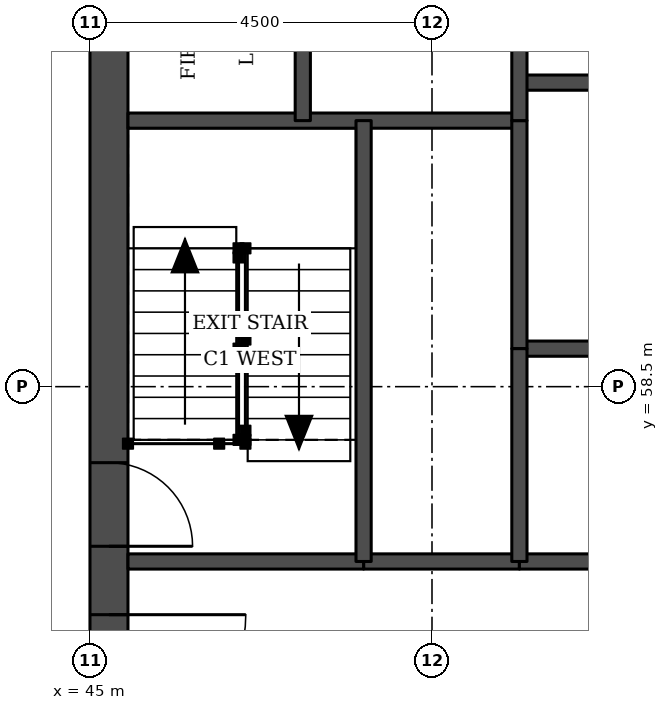
"""IFC4 building model, lengths in metres.
Left out: names, types, materials, properties, quantities, classifications, styles, units other than length and angle.
Written with IfcOpenShell. Run it as: python <this file> out.ifc"""

import sys

from ifc_helpers import new_model, si_unit, direction, frame, frame_2d, origin, place, context, subcontext, project, spatial, rectangle, extrude, element, fill, save


model = new_model("IFC4")
c1 = context("Model", 3, precision=1e-05, world=origin(), true_north=direction((0.0, 1.0)))
c2 = subcontext(c1, "Body", "Model", "MODEL_VIEW")
j1 = project(units=[si_unit("LENGTHUNIT", "METRE"), si_unit("PLANEANGLEUNIT", "RADIAN")], contexts=[c1])
p1 = place(None, origin())
s1 = spatial("IfcSite", under=j1, at=p1, CompositionType="ELEMENT")
p2 = place(p1, origin())
s2 = spatial("IfcBuilding", under=s1, at=p2, CompositionType="ELEMENT")
p3 = place(p2, frame((0.0, 0.0, 36.3)))
s3 = spatial("IfcBuildingStorey", under=s2, at=p3, CompositionType="ELEMENT", Elevation=36.3)
p4 = place(p3, frame((45.25, 49.5, 0.0), z_axis=(0.0, 0.0, 1.0), x_axis=(0.0, 1.0, 0.0)))
e1 = element("IfcWall", 1, at=p4, inside=s3, PredefinedType="SHEAR", context=c2, shape_type="SweptSolid", body=[
    extrude(rectangle(XDim=22.5, YDim=0.5, at=frame_2d((11.25, 0.0))), origin(), (0.0, 0.0, 1.0), 3.3),
])
p5 = place(p4, frame((4.2, 0.0, 0.0)))
e2 = element("IfcOpeningElement", 2, at=p5, cuts=e1, PredefinedType="OPENING", context=c2, shape_type="SweptSolid", body=[
    extrude(rectangle(XDim=1.8, YDim=2.1, at=frame_2d((0.9, 1.05))), frame((0.0, 0.26, 0.0), z_axis=(0.0, -1.0, 0.0), x_axis=(1.0, 0.0, 0.0)), (0.0, 0.0, 1.0), 0.52),
])
p6 = place(p4, frame((6.9, 0.0, 0.0)))
e3 = element("IfcOpeningElement", 3, at=p6, cuts=e1, PredefinedType="OPENING", context=c2, shape_type="SweptSolid", body=[
    extrude(rectangle(XDim=1.1, YDim=2.1, at=frame_2d((0.55, 1.05))), frame((0.0, 0.26, 0.0), z_axis=(0.0, -1.0, 0.0), x_axis=(1.0, 0.0, 0.0)), (0.0, 0.0, 1.0), 0.52),
])
p7 = place(p4, frame((13.6, 0.0, 0.0)))
e4 = element("IfcOpeningElement", 4, at=p7, cuts=e1, PredefinedType="OPENING", context=c2, shape_type="SweptSolid", body=[
    extrude(rectangle(XDim=1.1, YDim=2.1, at=frame_2d((0.55, 1.05))), frame((0.0, 0.26, 0.0), z_axis=(0.0, -1.0, 0.0), x_axis=(1.0, 0.0, 0.0)), (0.0, 0.0, 1.0), 0.52),
])
p8 = place(p4, frame((16.5, 0.0, 0.0)))
e5 = element("IfcOpeningElement", 5, at=p8, cuts=e1, PredefinedType="OPENING", context=c2, shape_type="SweptSolid", body=[
    extrude(rectangle(XDim=1.8, YDim=2.1, at=frame_2d((0.9, 1.05))), frame((0.0, 0.26, 0.0), z_axis=(0.0, -1.0, 0.0), x_axis=(1.0, 0.0, 0.0)), (0.0, 0.0, 1.0), 0.52),
])
p9 = place(p3, frame((48.6, 56.2, 0.0), z_axis=(0.0, 0.0, 1.0), x_axis=(1.0, 0.0, 0.0)))
e6 = element("IfcWall", 6, at=p9, inside=s3, PredefinedType="SOLIDWALL", context=c2, shape_type="SweptSolid", body=[
    extrude(rectangle(XDim=2.05, YDim=0.2, at=frame_2d((1.025, 0.0))), origin(), (0.0, 0.0, 1.0), 3.08),
])
p10 = place(p3, frame((45.5, 56.2, 0.0), z_axis=(0.0, 0.0, 1.0), x_axis=(1.0, 0.0, 0.0)))
e7 = element("IfcWall", 7, at=p10, inside=s3, PredefinedType="SOLIDWALL", context=c2, shape_type="SweptSolid", body=[
    extrude(rectangle(XDim=3.1, YDim=0.2, at=frame_2d((1.55, 0.0))), origin(), (0.0, 0.0, 1.0), 3.08),
])
p11 = place(p3, frame((50.65, 56.2, 0.0), z_axis=(0.0, 0.0, 1.0), x_axis=(1.0, 0.0, 0.0)))
e8 = element("IfcWall", 8, at=p11, inside=s3, PredefinedType="SOLIDWALL", context=c2, shape_type="SweptSolid", body=[
    extrude(rectangle(XDim=11.2, YDim=0.2, at=frame_2d((5.6, 0.0))), origin(), (0.0, 0.0, 1.0), 3.08),
])
p12 = place(p3, frame((50.65, 59.0, 0.0), z_axis=(0.0, 0.0, 1.0), x_axis=(1.0, 0.0, 0.0)))
e9 = element("IfcWall", 9, at=p12, inside=s3, PredefinedType="SOLIDWALL", context=c2, shape_type="SweptSolid", body=[
    extrude(rectangle(XDim=11.2, YDim=0.2, at=frame_2d((5.6, 0.0))), origin(), (0.0, 0.0, 1.0), 3.3),
])
p13 = place(p3, frame((45.5, 62.0, 0.0), z_axis=(0.0, 0.0, 1.0), x_axis=(1.0, 0.0, 0.0)))
e10 = element("IfcWall", 10, at=p13, inside=s3, PredefinedType="SOLIDWALL", context=c2, shape_type="SweptSolid", body=[
    extrude(rectangle(XDim=5.15, YDim=0.2, at=frame_2d((2.575, 0.0))), origin(), (0.0, 0.0, 1.0), 3.08),
])
p14 = place(p3, frame((50.65, 62.5, 0.0), z_axis=(0.0, 0.0, 1.0), x_axis=(1.0, 0.0, 0.0)))
e11 = element("IfcWall", 11, at=p14, inside=s3, PredefinedType="SOLIDWALL", context=c2, shape_type="SweptSolid", body=[
    extrude(rectangle(XDim=11.2, YDim=0.2, at=frame_2d((5.6, 0.0))), origin(), (0.0, 0.0, 1.0), 3.3),
])
p15 = place(p3, frame((47.8, 62.0, 0.0), z_axis=(0.0, 0.0, 1.0), x_axis=(0.0, 1.0, 0.0)))
e12 = element("IfcWall", 12, at=p15, inside=s3, PredefinedType="SOLIDWALL", context=c2, shape_type="SweptSolid", body=[
    extrude(rectangle(XDim=3.3, YDim=0.2, at=frame_2d((1.65, 0.0))), origin(), (0.0, 0.0, 1.0), 3.08),
])
p16 = place(p15, frame((1.1, 0.0, 0.0)))
e13 = element("IfcOpeningElement", 13, at=p16, cuts=e12, PredefinedType="OPENING", context=c2, shape_type="SweptSolid", body=[
    extrude(rectangle(XDim=1.1, YDim=2.1, at=frame_2d((0.55, 1.05))), frame((0.0, 0.11, 0.0), z_axis=(0.0, -1.0, 0.0), x_axis=(1.0, 0.0, 0.0)), (0.0, 0.0, 1.0), 0.22),
])
p17 = place(p3, frame((48.6, 56.2, 0.0), z_axis=(0.0, 0.0, 1.0), x_axis=(0.0, 1.0, 0.0)))
e14 = element("IfcWall", 14, at=p17, inside=s3, PredefinedType="SOLIDWALL", context=c2, shape_type="SweptSolid", body=[
    extrude(rectangle(XDim=5.8, YDim=0.2, at=frame_2d((2.9, 0.0))), origin(), (0.0, 0.0, 1.0), 3.08),
])
p18 = place(p3, frame((50.65, 59.0, 0.0), z_axis=(0.0, 0.0, 1.0), x_axis=(0.0, 1.0, 0.0)))
e15 = element("IfcWall", 15, at=p18, inside=s3, PredefinedType="SOLIDWALL", context=c2, shape_type="SweptSolid", body=[
    extrude(rectangle(XDim=3.0, YDim=0.2, at=frame_2d((1.5, 0.0))), origin(), (0.0, 0.0, 1.0), 3.3),
])
p19 = place(p3, frame((50.65, 56.2, 0.0), z_axis=(0.0, 0.0, 1.0), x_axis=(0.0, 1.0, 0.0)))
e16 = element("IfcWall", 16, at=p19, inside=s3, PredefinedType="SOLIDWALL", context=c2, shape_type="SweptSolid", body=[
    extrude(rectangle(XDim=2.8, YDim=0.2, at=frame_2d((1.4, 0.0))), origin(), (0.0, 0.0, 1.0), 3.08),
])
p20 = place(p3, frame((50.65, 62.0, 0.0), z_axis=(0.0, 0.0, 1.0), x_axis=(0.0, 1.0, 0.0)))
e17 = element("IfcWall", 17, at=p20, inside=s3, PredefinedType="SOLIDWALL", context=c2, shape_type="SweptSolid", body=[
    extrude(rectangle(XDim=3.3, YDim=0.2, at=frame_2d((1.65, 0.0))), origin(), (0.0, 0.0, 1.0), 3.08),
])
p21 = place(p5, frame((1.8, 0.0, 0.0), z_axis=(0.0, 0.0, 1.0), x_axis=(-1.0, 0.0, 0.0)))
e18 = element("IfcDoor", 18, at=p21, inside=s3, OperationType="SINGLE_SWING_LEFT", PredefinedType="DOOR", context=c2, shape_type="SweptSolid", body=[
    extrude(rectangle(XDim=1.8, YDim=2.1, at=frame_2d((0.9, 1.05))), frame((0.0, 0.025, 0.0), z_axis=(0.0, -1.0, 0.0), x_axis=(1.0, 0.0, 0.0)), (0.0, 0.0, 1.0), 0.05),
])
fill(e2, e18)
p22 = place(p6, frame((1.1, 0.0, 0.0), z_axis=(0.0, 0.0, 1.0), x_axis=(-1.0, 0.0, 0.0)))
e19 = element("IfcDoor", 19, at=p22, inside=s3, OperationType="SINGLE_SWING_RIGHT", PredefinedType="DOOR", context=c2, shape_type="SweptSolid", body=[
    extrude(rectangle(XDim=1.1, YDim=2.1, at=frame_2d((0.55, 1.05))), frame((0.0, 0.025, 0.0), z_axis=(0.0, -1.0, 0.0), x_axis=(1.0, 0.0, 0.0)), (0.0, 0.0, 1.0), 0.05),
])
fill(e3, e19)
save(model, sys.argv[1])
